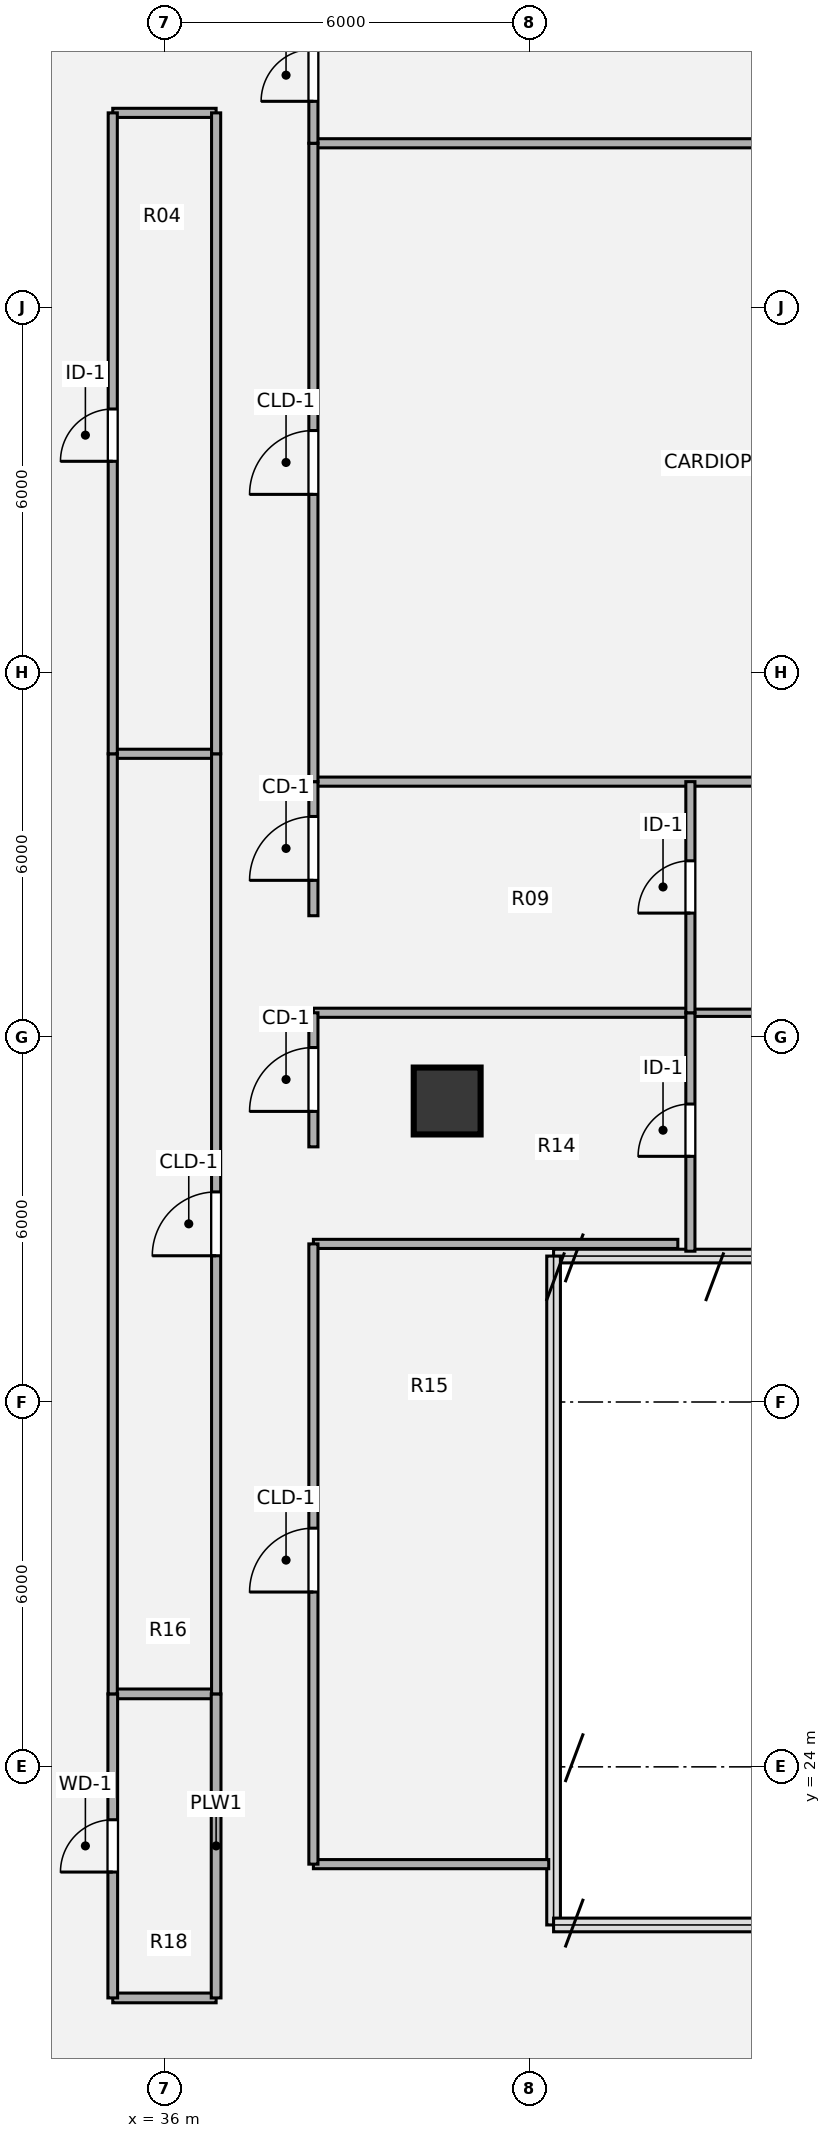
"""IFC4 building model, lengths in metres.
Left out: names, types, materials, properties, quantities, classifications, styles, units other than length and angle.
Written with IfcOpenShell. Run it as: python <this file> out.ifc"""

import sys

from ifc_helpers import new_model, si_unit, direction, frame, frame_2d, origin, origin_2d, place, context, subcontext, project, spatial, rectangle, hollow_circle, extrude, source, transform, mapped, element, fill, save


model = new_model("IFC4")
c1 = context("Model", 3, precision=1e-05, world=origin(), true_north=direction((0.0, 1.0)))
c2 = subcontext(c1, "Body", "Model", "MODEL_VIEW")
j1 = project(units=[si_unit("LENGTHUNIT", "METRE"), si_unit("PLANEANGLEUNIT", "RADIAN")], contexts=[c1])
p1 = place(None, origin())
s1 = spatial("IfcSite", under=j1, at=p1, CompositionType="ELEMENT")
p2 = place(p1, origin())
s2 = spatial("IfcBuilding", under=s1, at=p2, CompositionType="ELEMENT")
p3 = place(p2, frame((0.0, 0.0, 175.32)))
s3 = spatial("IfcBuildingStorey", under=s2, at=p3, CompositionType="ELEMENT", Elevation=175.32)
m1 = source(origin(), c2, "Body", "SweptSolid", [
    extrude(hollow_circle(Radius=0.55, WallThickness=0.04, at=origin_2d()), origin(), (0.0, 0.0, 1.0), 3.78),
])
p4 = place(p3, frame((40.65, 34.95, 0.0), z_axis=(0.0, 0.0, 1.0), x_axis=(1.0, 0.0, 0.0)))
e1 = element("IfcColumn", 1, at=p4, inside=s3, PredefinedType="COLUMN", context=c2, shape_type="MappedRepresentation", body=[
    mapped(m1, transform((0.0, 0.0, 0.0), x_axis=(1.0, 0.0, 0.0), y_axis=(0.0, 1.0, 0.0), z_axis=(0.0, 0.0, 1.0), scale=1.0)),
])
p5 = place(p3, frame((35.15, 20.2, 0.0), z_axis=(0.0, 0.0, 1.0), x_axis=(1.0, 0.0, 0.0)))
e2 = element("IfcWall", 2, at=p5, inside=s3, PredefinedType="PLUMBINGWALL", context=c2, shape_type="SweptSolid", body=[
    extrude(rectangle(XDim=1.7, YDim=0.16, at=frame_2d((0.85, 0.0))), origin(), (0.0, 0.0, 1.0), 3.5),
])
p6 = place(p3, frame((38.45, 22.4, 0.0), z_axis=(0.0, 0.0, 1.0), x_axis=(1.0, 0.0, 0.0)))
e3 = element("IfcWall", 3, at=p6, inside=s3, PredefinedType="PARTITIONING", context=c2, shape_type="SweptSolid", body=[
    extrude(rectangle(XDim=3.87, YDim=0.15, at=frame_2d((1.935, 0.0))), origin(), (0.0, 0.0, 1.0), 3.5),
])
p7 = place(p3, frame((35.15, 25.2, 0.0), z_axis=(0.0, 0.0, 1.0), x_axis=(1.0, 0.0, 0.0)))
e4 = element("IfcWall", 4, at=p7, inside=s3, PredefinedType="PLUMBINGWALL", context=c2, shape_type="SweptSolid", body=[
    extrude(rectangle(XDim=1.7, YDim=0.16, at=frame_2d((0.85, 0.0))), origin(), (0.0, 0.0, 1.0), 3.5),
])
p8 = place(p3, frame((38.45, 32.6, 0.0), z_axis=(0.0, 0.0, 1.0), x_axis=(1.0, 0.0, 0.0)))
e5 = element("IfcWall", 5, at=p8, inside=s3, PredefinedType="PARTITIONING", context=c2, shape_type="SweptSolid", body=[
    extrude(rectangle(XDim=5.993, YDim=0.15, at=frame_2d((2.997, 0.0))), origin(), (0.0, 0.0, 1.0), 3.5),
])
p9 = place(p3, frame((38.45, 36.401, 0.0), z_axis=(0.0, 0.0, 1.0), x_axis=(1.0, 0.0, 0.0)))
e6 = element("IfcWall", 6, at=p9, inside=s3, PredefinedType="PARTITIONING", context=c2, shape_type="SweptSolid", body=[
    extrude(rectangle(XDim=6.2, YDim=0.15, at=frame_2d((3.1, 0.0))), origin(), (0.0, 0.0, 1.0), 2.982),
])
p10 = place(p3, frame((44.65, 36.401, 0.0), z_axis=(0.0, 0.0, 1.0), x_axis=(1.0, 0.0, 0.0)))
e7 = element("IfcWall", 7, at=p10, inside=s3, PredefinedType="PARTITIONING", context=c2, shape_type="SweptSolid", body=[
    extrude(rectangle(XDim=11.47, YDim=0.12, at=frame_2d((5.735, 0.0))), origin(), (0.0, 0.0, 1.0), 2.982),
])
p11 = place(p3, frame((38.45, 40.202, 0.0), z_axis=(0.0, 0.0, 1.0), x_axis=(1.0, 0.0, 0.0)))
e8 = element("IfcWall", 8, at=p11, inside=s3, PredefinedType="PARTITIONING", context=c2, shape_type="SweptSolid", body=[
    extrude(rectangle(XDim=17.67, YDim=0.15, at=frame_2d((8.835, 0.0))), origin(), (0.0, 0.0, 1.0), 2.982),
])
p12 = place(p3, frame((35.15, 40.66, 0.0), z_axis=(0.0, 0.0, 1.0), x_axis=(1.0, 0.0, 0.0)))
e9 = element("IfcWall", 9, at=p12, inside=s3, PredefinedType="PARTITIONING", context=c2, shape_type="SweptSolid", body=[
    extrude(rectangle(XDim=1.7, YDim=0.15, at=frame_2d((0.85, 0.0))), origin(), (0.0, 0.0, 1.0), 3.259),
])
p13 = place(p3, frame((38.45, 50.7, 0.0), z_axis=(0.0, 0.0, 1.0), x_axis=(1.0, 0.0, 0.0)))
e10 = element("IfcWall", 10, at=p13, inside=s3, PredefinedType="PARTITIONING", context=c2, shape_type="SweptSolid", body=[
    extrude(rectangle(XDim=17.569, YDim=0.15, at=frame_2d((8.785, 0.0))), origin(), (0.0, 0.0, 1.0), 3.308),
])
p14 = place(p3, frame((35.15, 51.2, 0.0), z_axis=(0.0, 0.0, 1.0), x_axis=(1.0, 0.0, 0.0)))
e11 = element("IfcWall", 11, at=p14, inside=s3, PredefinedType="PARTITIONING", context=c2, shape_type="SweptSolid", body=[
    extrude(rectangle(XDim=1.7, YDim=0.15, at=frame_2d((0.85, 0.0))), origin(), (0.0, 0.0, 1.0), 3.308),
])
p15 = place(p3, frame((35.15, 20.2, 0.0), z_axis=(0.0, 0.0, 1.0), x_axis=(0.0, 1.0, 0.0)))
e12 = element("IfcWall", 12, at=p15, inside=s3, PredefinedType="PLUMBINGWALL", context=c2, shape_type="SweptSolid", body=[
    extrude(rectangle(XDim=5.0, YDim=0.16, at=frame_2d((2.5, 0.0))), origin(), (0.0, 0.0, 1.0), 3.5),
])
p16 = place(p15, frame((2.07, 0.0, 0.0)))
e13 = element("IfcOpeningElement", 13, at=p16, cuts=e12, PredefinedType="OPENING", context=c2, shape_type="SweptSolid", body=[
    extrude(rectangle(XDim=0.86, YDim=2.1, at=origin_2d()), frame((0.43, 0.09, 1.05), z_axis=(0.0, -1.0, 0.0), x_axis=(1.0, 0.0, 0.0)), (0.0, 0.0, 1.0), 0.18),
])
p17 = place(p3, frame((35.15, 25.2, 0.0), z_axis=(0.0, 0.0, 1.0), x_axis=(0.0, 1.0, 0.0)))
e14 = element("IfcWall", 14, at=p17, inside=s3, PredefinedType="PARTITIONING", context=c2, shape_type="SweptSolid", body=[
    extrude(rectangle(XDim=15.46, YDim=0.15, at=frame_2d((7.73, 0.0))), origin(), (0.0, 0.0, 1.0), 3.5),
])
p18 = place(p3, frame((35.15, 40.66, 0.0), z_axis=(0.0, 0.0, 1.0), x_axis=(0.0, 1.0, 0.0)))
e15 = element("IfcWall", 15, at=p18, inside=s3, PredefinedType="PARTITIONING", context=c2, shape_type="SweptSolid", body=[
    extrude(rectangle(XDim=10.54, YDim=0.15, at=frame_2d((5.27, 0.0))), origin(), (0.0, 0.0, 1.0), 3.5),
])
p19 = place(p18, frame((4.81, 0.0, 0.0)))
e16 = element("IfcOpeningElement", 16, at=p19, cuts=e15, PredefinedType="OPENING", context=c2, shape_type="SweptSolid", body=[
    extrude(rectangle(XDim=0.86, YDim=2.1, at=origin_2d()), frame((0.43, 0.085, 1.05), z_axis=(0.0, -1.0, 0.0), x_axis=(1.0, 0.0, 0.0)), (0.0, 0.0, 1.0), 0.17),
])
p20 = place(p3, frame((36.85, 20.2, 0.0), z_axis=(0.0, 0.0, 1.0), x_axis=(0.0, 1.0, 0.0)))
e17 = element("IfcWall", 17, at=p20, inside=s3, PredefinedType="PLUMBINGWALL", context=c2, shape_type="SweptSolid", body=[
    extrude(rectangle(XDim=5.0, YDim=0.16, at=frame_2d((2.5, 0.0))), origin(), (0.0, 0.0, 1.0), 3.5),
])
p21 = place(p3, frame((36.85, 25.2, 0.0), z_axis=(0.0, 0.0, 1.0), x_axis=(0.0, 1.0, 0.0)))
e18 = element("IfcWall", 18, at=p21, inside=s3, PredefinedType="PARTITIONING", context=c2, shape_type="SweptSolid", body=[
    extrude(rectangle(XDim=15.46, YDim=0.15, at=frame_2d((7.73, 0.0))), origin(), (0.0, 0.0, 1.0), 3.5),
])
p22 = place(p21, frame((7.205, 0.0, 0.0)))
e19 = element("IfcOpeningElement", 19, at=p22, cuts=e18, PredefinedType="OPENING", context=c2, shape_type="SweptSolid", body=[
    extrude(rectangle(XDim=1.05, YDim=2.1, at=origin_2d()), frame((0.525, 0.085, 1.05), z_axis=(0.0, -1.0, 0.0), x_axis=(1.0, 0.0, 0.0)), (0.0, 0.0, 1.0), 0.17),
])
p23 = place(p3, frame((36.85, 40.66, 0.0), z_axis=(0.0, 0.0, 1.0), x_axis=(0.0, 1.0, 0.0)))
e20 = element("IfcWall", 20, at=p23, inside=s3, PredefinedType="PARTITIONING", context=c2, shape_type="SweptSolid", body=[
    extrude(rectangle(XDim=10.54, YDim=0.15, at=frame_2d((5.27, 0.0))), origin(), (0.0, 0.0, 1.0), 3.5),
])
p24 = place(p3, frame((38.45, 22.4, 0.0), z_axis=(0.0, 0.0, 1.0), x_axis=(0.0, 1.0, 0.0)))
e21 = element("IfcWall", 21, at=p24, inside=s3, PredefinedType="PARTITIONING", context=c2, shape_type="SweptSolid", body=[
    extrude(rectangle(XDim=10.2, YDim=0.15, at=frame_2d((5.1, 0.0))), origin(), (0.0, 0.0, 1.0), 3.5),
])
p25 = place(p24, frame((4.475, 0.0, 0.0)))
e22 = element("IfcOpeningElement", 22, at=p25, cuts=e21, PredefinedType="OPENING", context=c2, shape_type="SweptSolid", body=[
    extrude(rectangle(XDim=1.05, YDim=2.1, at=origin_2d()), frame((0.525, 0.085, 1.05), z_axis=(0.0, -1.0, 0.0), x_axis=(1.0, 0.0, 0.0)), (0.0, 0.0, 1.0), 0.17),
])
p26 = place(p3, frame((38.45, 34.196, 0.0), z_axis=(0.0, 0.0, 1.0), x_axis=(0.0, 1.0, 0.0)))
e23 = element("IfcWall", 23, at=p26, inside=s3, PredefinedType="PARTITIONING", context=c2, shape_type="SweptSolid", body=[
    extrude(rectangle(XDim=2.205, YDim=0.15, at=frame_2d((1.103, 0.0))), origin(), (0.0, 0.0, 1.0), 3.5),
])
p27 = place(p26, frame((0.583, 0.0, 0.0)))
e24 = element("IfcOpeningElement", 24, at=p27, cuts=e23, PredefinedType="OPENING", context=c2, shape_type="SweptSolid", body=[
    extrude(rectangle(XDim=1.05, YDim=2.1, at=origin_2d()), frame((0.525, 0.085, 1.05), z_axis=(0.0, -1.0, 0.0), x_axis=(1.0, 0.0, 0.0)), (0.0, 0.0, 1.0), 0.17),
])
p28 = place(p3, frame((38.45, 37.997, 0.0), z_axis=(0.0, 0.0, 1.0), x_axis=(0.0, 1.0, 0.0)))
e25 = element("IfcWall", 25, at=p28, inside=s3, PredefinedType="PARTITIONING", context=c2, shape_type="SweptSolid", body=[
    extrude(rectangle(XDim=2.205, YDim=0.15, at=frame_2d((1.103, 0.0))), origin(), (0.0, 0.0, 1.0), 3.5),
])
p29 = place(p28, frame((0.582, 0.0, 0.0)))
e26 = element("IfcOpeningElement", 26, at=p29, cuts=e25, PredefinedType="OPENING", context=c2, shape_type="SweptSolid", body=[
    extrude(rectangle(XDim=1.05, YDim=2.1, at=origin_2d()), frame((0.525, 0.085, 1.05), z_axis=(0.0, -1.0, 0.0), x_axis=(1.0, 0.0, 0.0)), (0.0, 0.0, 1.0), 0.17),
])
p30 = place(p3, frame((38.45, 40.202, 0.0), z_axis=(0.0, 0.0, 1.0), x_axis=(0.0, 1.0, 0.0)))
e27 = element("IfcWall", 27, at=p30, inside=s3, PredefinedType="PARTITIONING", context=c2, shape_type="SweptSolid", body=[
    extrude(rectangle(XDim=10.498, YDim=0.15, at=frame_2d((5.249, 0.0))), origin(), (0.0, 0.0, 1.0), 3.5),
])
p31 = place(p30, frame((4.724, 0.0, 0.0)))
e28 = element("IfcOpeningElement", 28, at=p31, cuts=e27, PredefinedType="OPENING", context=c2, shape_type="SweptSolid", body=[
    extrude(rectangle(XDim=1.05, YDim=2.1, at=origin_2d()), frame((0.525, 0.085, 1.05), z_axis=(0.0, -1.0, 0.0), x_axis=(1.0, 0.0, 0.0)), (0.0, 0.0, 1.0), 0.17),
])
p32 = place(p3, frame((38.45, 50.7, 0.0), z_axis=(0.0, 0.0, 1.0), x_axis=(0.0, 1.0, 0.0)))
e29 = element("IfcWall", 29, at=p32, inside=s3, PredefinedType="PARTITIONING", context=c2, shape_type="SweptSolid", body=[
    extrude(rectangle(XDim=2.3, YDim=0.15, at=frame_2d((1.15, 0.0))), origin(), (0.0, 0.0, 1.0), 3.5),
])
p33 = place(p32, frame((0.69, 0.0, 0.0)))
e30 = element("IfcOpeningElement", 30, at=p33, cuts=e29, PredefinedType="OPENING", context=c2, shape_type="SweptSolid", body=[
    extrude(rectangle(XDim=0.86, YDim=2.1, at=origin_2d()), frame((0.43, 0.085, 1.05), z_axis=(0.0, -1.0, 0.0), x_axis=(1.0, 0.0, 0.0)), (0.0, 0.0, 1.0), 0.17),
])
p34 = place(p3, frame((44.65, 32.48, 0.0), z_axis=(0.0, 0.0, 1.0), x_axis=(0.0, 1.0, 0.0)))
e31 = element("IfcWall", 31, at=p34, inside=s3, PredefinedType="PARTITIONING", context=c2, shape_type="SweptSolid", body=[
    extrude(rectangle(XDim=3.921, YDim=0.15, at=frame_2d((1.96, 0.0))), origin(), (0.0, 0.0, 1.0), 3.5),
])
p35 = place(p34, frame((1.56, 0.0, 0.0)))
e32 = element("IfcOpeningElement", 32, at=p35, cuts=e31, PredefinedType="OPENING", context=c2, shape_type="SweptSolid", body=[
    extrude(rectangle(XDim=0.86, YDim=2.1, at=origin_2d()), frame((0.43, 0.085, 1.05), z_axis=(0.0, -1.0, 0.0), x_axis=(1.0, 0.0, 0.0)), (0.0, 0.0, 1.0), 0.17),
])
p36 = place(p3, frame((44.65, 36.401, 0.0), z_axis=(0.0, 0.0, 1.0), x_axis=(0.0, 1.0, 0.0)))
e33 = element("IfcWall", 33, at=p36, inside=s3, PredefinedType="PARTITIONING", context=c2, shape_type="SweptSolid", body=[
    extrude(rectangle(XDim=3.801, YDim=0.15, at=frame_2d((1.9, 0.0))), origin(), (0.0, 0.0, 1.0), 3.5),
])
p37 = place(p36, frame((1.639, 0.0, 0.0)))
e34 = element("IfcOpeningElement", 34, at=p37, cuts=e33, PredefinedType="OPENING", context=c2, shape_type="SweptSolid", body=[
    extrude(rectangle(XDim=0.86, YDim=2.1, at=origin_2d()), frame((0.43, 0.085, 1.05), z_axis=(0.0, -1.0, 0.0), x_axis=(1.0, 0.0, 0.0)), (0.0, 0.0, 1.0), 0.17),
])
m2 = source(origin(), c2, "Body", "SweptSolid", [
    extrude(rectangle(XDim=0.86, YDim=2.1, at=origin_2d()), frame((0.43, 0.025, 1.05), z_axis=(0.0, -1.0, 0.0), x_axis=(1.0, 0.0, 0.0)), (0.0, 0.0, 1.0), 0.05),
])
p38 = place(p16, origin())
e35 = element("IfcDoor", 35, at=p38, inside=s3, OperationType="SINGLE_SWING_LEFT", PredefinedType="DOOR", context=c2, shape_type="MappedRepresentation", body=[
    mapped(m2, transform((0.0, 0.0, 0.0), x_axis=(1.0, 0.0, 0.0), y_axis=(0.0, 1.0, 0.0), z_axis=(0.0, 0.0, 1.0), scale=1.0)),
])
fill(e13, e35)
m3 = source(origin(), c2, "Body", "SweptSolid", [
    extrude(rectangle(XDim=0.86, YDim=2.1, at=origin_2d()), frame((0.43, 0.025, 1.05), z_axis=(0.0, -1.0, 0.0), x_axis=(1.0, 0.0, 0.0)), (0.0, 0.0, 1.0), 0.05),
])
p39 = place(p19, origin())
e36 = element("IfcDoor", 36, at=p39, inside=s3, OperationType="SINGLE_SWING_LEFT", PredefinedType="DOOR", context=c2, shape_type="MappedRepresentation", body=[
    mapped(m3, transform((0.0, 0.0, 0.0), x_axis=(1.0, 0.0, 0.0), y_axis=(0.0, 1.0, 0.0), z_axis=(0.0, 0.0, 1.0), scale=1.0)),
])
fill(e16, e36)
m4 = source(origin(), c2, "Body", "SweptSolid", [
    extrude(rectangle(XDim=1.05, YDim=2.1, at=origin_2d()), frame((0.525, 0.025, 1.05), z_axis=(0.0, -1.0, 0.0), x_axis=(1.0, 0.0, 0.0)), (0.0, 0.0, 1.0), 0.05),
])
p40 = place(p22, origin())
e37 = element("IfcDoor", 37, at=p40, inside=s3, OperationType="SINGLE_SWING_LEFT", PredefinedType="DOOR", context=c2, shape_type="MappedRepresentation", body=[
    mapped(m4, transform((0.0, 0.0, 0.0), x_axis=(1.0, 0.0, 0.0), y_axis=(0.0, 1.0, 0.0), z_axis=(0.0, 0.0, 1.0), scale=1.0)),
])
fill(e19, e37)
p41 = place(p25, origin())
e38 = element("IfcDoor", 38, at=p41, inside=s3, OperationType="SINGLE_SWING_LEFT", PredefinedType="DOOR", context=c2, shape_type="MappedRepresentation", body=[
    mapped(m4, transform((0.0, 0.0, 0.0), x_axis=(1.0, 0.0, 0.0), y_axis=(0.0, 1.0, 0.0), z_axis=(0.0, 0.0, 1.0), scale=1.0)),
])
fill(e22, e38)
m5 = source(origin(), c2, "Body", "SweptSolid", [
    extrude(rectangle(XDim=1.05, YDim=2.1, at=origin_2d()), frame((0.525, 0.025, 1.05), z_axis=(0.0, -1.0, 0.0), x_axis=(1.0, 0.0, 0.0)), (0.0, 0.0, 1.0), 0.05),
])
p42 = place(p27, origin())
e39 = element("IfcDoor", 39, at=p42, inside=s3, OperationType="SINGLE_SWING_LEFT", PredefinedType="DOOR", context=c2, shape_type="MappedRepresentation", body=[
    mapped(m5, transform((0.0, 0.0, 0.0), x_axis=(1.0, 0.0, 0.0), y_axis=(0.0, 1.0, 0.0), z_axis=(0.0, 0.0, 1.0), scale=1.0)),
])
fill(e24, e39)
p43 = place(p29, origin())
e40 = element("IfcDoor", 40, at=p43, inside=s3, OperationType="SINGLE_SWING_LEFT", PredefinedType="DOOR", context=c2, shape_type="MappedRepresentation", body=[
    mapped(m5, transform((0.0, 0.0, 0.0), x_axis=(1.0, 0.0, 0.0), y_axis=(0.0, 1.0, 0.0), z_axis=(0.0, 0.0, 1.0), scale=1.0)),
])
fill(e26, e40)
p44 = place(p31, origin())
e41 = element("IfcDoor", 41, at=p44, inside=s3, OperationType="SINGLE_SWING_LEFT", PredefinedType="DOOR", context=c2, shape_type="MappedRepresentation", body=[
    mapped(m4, transform((0.0, 0.0, 0.0), x_axis=(1.0, 0.0, 0.0), y_axis=(0.0, 1.0, 0.0), z_axis=(0.0, 0.0, 1.0), scale=1.0)),
])
fill(e28, e41)
p45 = place(p33, origin())
e42 = element("IfcDoor", 42, at=p45, inside=s3, OperationType="SINGLE_SWING_LEFT", PredefinedType="DOOR", context=c2, shape_type="MappedRepresentation", body=[
    mapped(m3, transform((0.0, 0.0, 0.0), x_axis=(1.0, 0.0, 0.0), y_axis=(0.0, 1.0, 0.0), z_axis=(0.0, 0.0, 1.0), scale=1.0)),
])
fill(e30, e42)
p46 = place(p35, origin())
e43 = element("IfcDoor", 43, at=p46, inside=s3, OperationType="SINGLE_SWING_LEFT", PredefinedType="DOOR", context=c2, shape_type="MappedRepresentation", body=[
    mapped(m3, transform((0.0, 0.0, 0.0), x_axis=(1.0, 0.0, 0.0), y_axis=(0.0, 1.0, 0.0), z_axis=(0.0, 0.0, 1.0), scale=1.0)),
])
fill(e32, e43)
p47 = place(p37, origin())
e44 = element("IfcDoor", 44, at=p47, inside=s3, OperationType="SINGLE_SWING_LEFT", PredefinedType="DOOR", context=c2, shape_type="MappedRepresentation", body=[
    mapped(m3, transform((0.0, 0.0, 0.0), x_axis=(1.0, 0.0, 0.0), y_axis=(0.0, 1.0, 0.0), z_axis=(0.0, 0.0, 1.0), scale=1.0)),
])
fill(e34, e44)
save(model, sys.argv[1])
